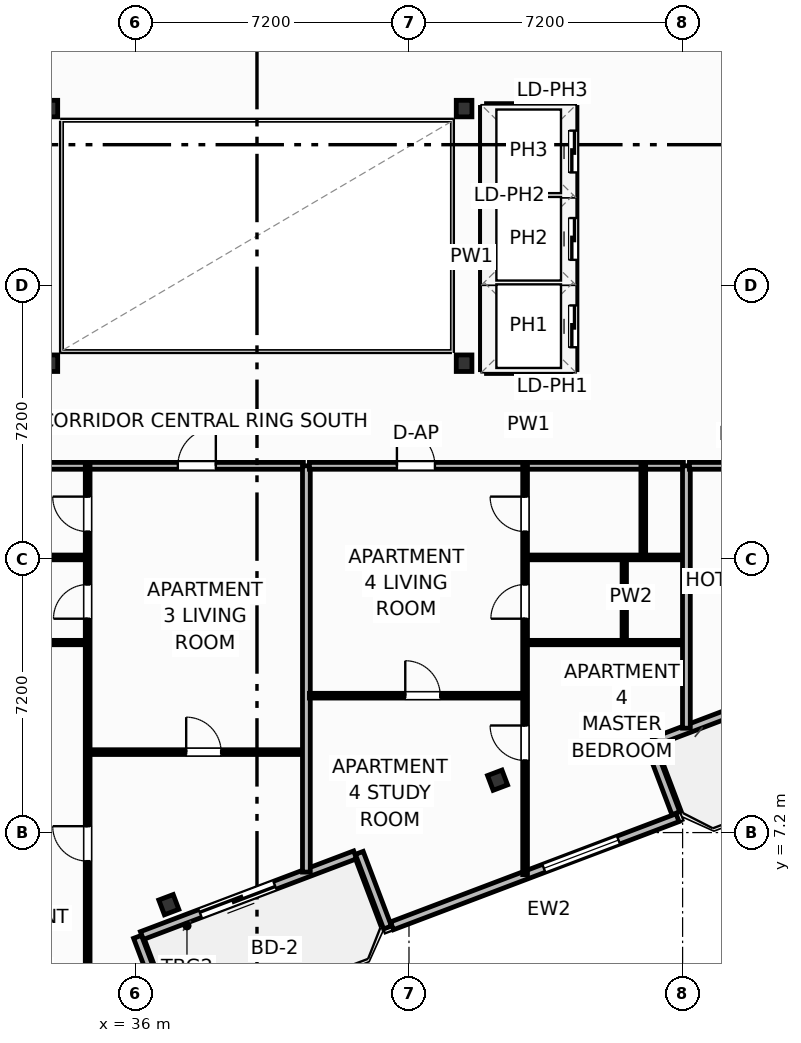
"""IFC4 building model, lengths in metres.
Left out: names, types, materials, properties, quantities, classifications, styles, units other than length and angle.
Written with IfcOpenShell. Run it as: python <this file> out.ifc"""

import sys

from ifc_helpers import new_model, si_unit, direction, frame, frame_2d, origin, origin_2d, place, context, subcontext, project, spatial, rectangle, i_section, extrude, element, fill, save


model = new_model("IFC4")
c1 = context("Model", 3, precision=1e-05, world=origin(), true_north=direction((0.0, 1.0)))
c2 = subcontext(c1, "Body", "Model", "MODEL_VIEW")
j1 = project(units=[si_unit("LENGTHUNIT", "METRE"), si_unit("PLANEANGLEUNIT", "RADIAN")], contexts=[c1])
p1 = place(None, origin())
s1 = spatial("IfcSite", under=j1, at=p1, CompositionType="ELEMENT")
p2 = place(p1, origin())
s2 = spatial("IfcBuilding", under=s1, at=p2, CompositionType="ELEMENT")
p3 = place(p2, frame((0.0, 0.0, 216.4)))
s3 = spatial("IfcBuildingStorey", under=s2, at=p3, CompositionType="ELEMENT", Elevation=216.4)
for number, where, z_axis, x_axis in (
    (1, (33.75, 19.55, 0.0), (0.0, 0.0, 1.0), (1.0, 0.0, 0.0)),
    (2, (44.65, 19.55, 0.0), (0.0, 0.0, 1.0), (1.0, 0.0, 0.0)),
    (3, (33.75, 26.25, 0.0), (0.0, 0.0, 1.0), (1.0, 0.0, 0.0)),
    (4, (44.65, 26.25, 0.0), (0.0, 0.0, 1.0), (1.0, 0.0, 0.0)),
):
    element("IfcColumn", number, at=place(p3, frame(where, z_axis=z_axis, x_axis=x_axis)), inside=s3, PredefinedType="COLUMN", context=c2, shape_type="SweptSolid", body=[
        extrude(i_section(OverallWidth=0.412, OverallDepth=0.435, WebThickness=0.036, FlangeThickness=0.057, FilletRadius=0.025, at=origin_2d()), origin(), (0.0, 0.0, 1.0), 3.7),
    ])
for number, where, z_axis, x_axis in (
    (5, (36.88, 5.303, 0.0), (0.0, 0.0, 1.0), (0.935, 0.354, 0.0)),
    (6, (45.531, 8.578, 0.0), (0.0, 0.0, 1.0), (0.935, 0.354, 0.0)),
):
    element("IfcColumn", number, at=place(p3, frame(where, z_axis=z_axis, x_axis=x_axis)), inside=s3, PredefinedType="COLUMN", context=c2, shape_type="SweptSolid", body=[
        extrude(i_section(OverallWidth=0.406, OverallDepth=0.416, WebThickness=0.03, FlangeThickness=0.048, FilletRadius=0.025, at=origin_2d()), origin(), (0.0, 0.0, 1.0), 3.7),
    ])
p4 = place(p3, frame((41.783, 6.614, 0.0), z_axis=(0.0, 0.0, 1.0), x_axis=(-0.93521416643, -0.354082565101, 0.0)))
e7 = element("IfcWall", 7, at=p4, inside=s3, PredefinedType="SOLIDWALL", context=c2, shape_type="SweptSolid", body=[
    extrude(rectangle(XDim=6.0, YDim=0.22, at=frame_2d((3.0, 0.0))), origin(), (0.0, 0.0, 1.0), 2.73),
])
p5 = place(p4, frame((2.26, 0.0, 0.0)))
e8 = element("IfcOpeningElement", 8, at=p5, cuts=e7, PredefinedType="OPENING", context=c2, shape_type="SweptSolid", body=[
    extrude(rectangle(XDim=2.1, YDim=2.3, at=frame_2d((1.05, 1.15))), frame((0.0, 0.12, 0.0), z_axis=(0.0, -1.0, 0.0), x_axis=(1.0, 0.0, 0.0)), (0.0, 0.0, 1.0), 0.24),
])
p6 = place(p3, frame((55.25, 11.713, 0.0), z_axis=(0.0, 0.0, 1.0), x_axis=(-0.935227640088, -0.354046976001, 0.0)))
e9 = element("IfcWall", 9, at=p6, inside=s3, PredefinedType="SOLIDWALL", context=c2, shape_type="SweptSolid", body=[
    extrude(rectangle(XDim=6.0, YDim=0.22, at=frame_2d((3.0, 0.0))), origin(), (0.0, 0.0, 1.0), 2.73),
])
p7 = place(p6, frame((1.516, 0.0, 0.0)))
e10 = element("IfcOpeningElement", 10, at=p7, cuts=e9, PredefinedType="OPENING", context=c2, shape_type="SweptSolid", body=[
    extrude(rectangle(XDim=2.1, YDim=2.3, at=frame_2d((1.05, 1.15))), frame((0.0, 0.12, 0.0), z_axis=(0.0, -1.0, 0.0), x_axis=(1.0, 0.0, 0.0)), (0.0, 0.0, 1.0), 0.24),
])
p8 = place(p3, frame((36.755, 2.61, 0.0), z_axis=(0.0, 0.0, 1.0), x_axis=(-0.354020680661, 0.935237594232, 0.0)))
e11 = element("IfcWall", 11, at=p8, inside=s3, PredefinedType="SOLIDWALL", context=c2, shape_type="SweptSolid", body=[
    extrude(rectangle(XDim=1.975, YDim=0.22, at=frame_2d((0.988, 0.0))), origin(), (0.0, 0.0, 1.0), 2.73),
])
p9 = place(p3, frame((41.892, 6.666, 0.0), z_axis=(0.0, 0.0, 1.0), x_axis=(0.354128469405, -0.935196785258, 0.0)))
e12 = element("IfcWall", 12, at=p9, inside=s3, PredefinedType="SOLIDWALL", context=c2, shape_type="SweptSolid", body=[
    extrude(rectangle(XDim=2.1, YDim=0.22, at=frame_2d((1.05, 0.0))), origin(), (0.0, 0.0, 1.0), 2.73),
])
p10 = place(p3, frame((42.752, 4.746, 0.0), z_axis=(0.0, 0.0, 1.0), x_axis=(0.935216926991, 0.354075273733, 0.0)))
e13 = element("IfcWall", 13, at=p10, inside=s3, PredefinedType="SOLIDWALL", context=c2, shape_type="SweptSolid", body=[
    extrude(rectangle(XDim=8.035, YDim=0.22, at=frame_2d((4.018, 0.0))), origin(), (0.0, 0.0, 1.0), 2.73),
])
p11 = place(p10, frame((4.273, 0.0, 0.8)))
e14 = element("IfcOpeningElement", 14, at=p11, cuts=e13, PredefinedType="OPENING", context=c2, shape_type="SweptSolid", body=[
    extrude(rectangle(XDim=2.1, YDim=1.75, at=frame_2d((1.05, 0.875))), frame((0.0, 0.12, 0.0), z_axis=(0.0, -1.0, 0.0), x_axis=(1.0, 0.0, 0.0)), (0.0, 0.0, 1.0), 0.24),
])
p12 = place(p3, frame((50.223, 7.708, 0.0), z_axis=(0.0, 0.0, 1.0), x_axis=(-0.354020680661, 0.935237594232, 0.0)))
e15 = element("IfcWall", 15, at=p12, inside=s3, PredefinedType="SOLIDWALL", context=c2, shape_type="SweptSolid", body=[
    extrude(rectangle(XDim=1.975, YDim=0.22, at=frame_2d((0.988, 0.0))), origin(), (0.0, 0.0, 1.0), 2.73),
])
p13 = place(p3, frame((34.815, 9.317, 0.0), z_axis=(0.0, 0.0, 1.0), x_axis=(1.0, 0.0, 0.0)))
e16 = element("IfcWall", 16, at=p13, inside=s3, PredefinedType="PARTITIONING", context=c2, shape_type="SweptSolid", body=[
    extrude(rectangle(XDim=5.605, YDim=0.125, at=frame_2d((2.803, 0.0))), origin(), (0.0, 0.0, 1.0), 3.45),
])
p14 = place(p13, frame((2.522, 0.0, 0.0)))
e17 = element("IfcOpeningElement", 17, at=p14, cuts=e16, PredefinedType="OPENING", context=c2, shape_type="SweptSolid", body=[
    extrude(rectangle(XDim=0.92, YDim=2.05, at=frame_2d((0.46, 1.025))), frame((0.0, 0.073, 0.0), z_axis=(0.0, -1.0, 0.0), x_axis=(1.0, 0.0, 0.0)), (0.0, 0.0, 1.0), 0.145),
])
p15 = place(p3, frame((30.58, 16.85, 0.0), z_axis=(0.0, 0.0, 1.0), x_axis=(1.0, 0.0, 0.0)))
e18 = element("IfcWall", 18, at=p15, inside=s3, PredefinedType="PARTITIONING", context=c2, shape_type="SweptSolid", body=[
    extrude(rectangle(XDim=9.84, YDim=0.18, at=frame_2d((4.92, 0.0))), origin(), (0.0, 0.0, 1.0), 3.45),
])
p16 = place(p15, frame((6.537, 0.0, 0.0)))
e19 = element("IfcOpeningElement", 19, at=p16, cuts=e18, PredefinedType="OPENING", context=c2, shape_type="SweptSolid", body=[
    extrude(rectangle(XDim=1.0, YDim=2.2, at=frame_2d((0.5, 1.1))), frame((0.0, 0.1, 0.0), z_axis=(0.0, -1.0, 0.0), x_axis=(1.0, 0.0, 0.0)), (0.0, 0.0, 1.0), 0.2),
])
p17 = place(p3, frame((34.745, 1.736, 0.0), z_axis=(0.0, 0.0, 1.0), x_axis=(0.0, 1.0, 0.0)))
e20 = element("IfcWall", 20, at=p17, inside=s3, PredefinedType="PARTITIONING", context=c2, shape_type="SweptSolid", body=[
    extrude(rectangle(XDim=15.114, YDim=0.125, at=frame_2d((7.557, 0.0))), origin(), (0.0, 0.0, 1.0), 2.739),
])
p18 = place(p17, frame((4.712, 0.0, 0.0)))
e21 = element("IfcOpeningElement", 21, at=p18, cuts=e20, PredefinedType="OPENING", context=c2, shape_type="SweptSolid", body=[
    extrude(rectangle(XDim=0.92, YDim=2.05, at=frame_2d((0.46, 1.025))), frame((0.0, 0.073, 0.0), z_axis=(0.0, -1.0, 0.0), x_axis=(1.0, 0.0, 0.0)), (0.0, 0.0, 1.0), 0.145),
])
p19 = place(p17, frame((11.091, 0.0, 0.0)))
e22 = element("IfcOpeningElement", 22, at=p19, cuts=e20, PredefinedType="OPENING", context=c2, shape_type="SweptSolid", body=[
    extrude(rectangle(XDim=0.9, YDim=2.05, at=frame_2d((0.45, 1.025))), frame((0.0, 0.073, 0.0), z_axis=(0.0, -1.0, 0.0), x_axis=(1.0, 0.0, 0.0)), (0.0, 0.0, 1.0), 0.145),
])
p20 = place(p17, frame((13.384, 0.0, 0.0)))
e23 = element("IfcOpeningElement", 23, at=p20, cuts=e20, PredefinedType="OPENING", context=c2, shape_type="SweptSolid", body=[
    extrude(rectangle(XDim=0.92, YDim=2.05, at=frame_2d((0.46, 1.025))), frame((0.0, 0.073, 0.0), z_axis=(0.0, -1.0, 0.0), x_axis=(1.0, 0.0, 0.0)), (0.0, 0.0, 1.0), 0.145),
])
p21 = place(p3, frame((30.58, 14.44, 0.0), z_axis=(0.0, 0.0, 1.0), x_axis=(1.0, 0.0, 0.0)))
e24 = element("IfcWall", 24, at=p21, inside=s3, PredefinedType="PARTITIONING", context=c2, shape_type="SweptSolid", body=[
    extrude(rectangle(XDim=4.095, YDim=0.125, at=frame_2d((2.047, 0.0))), origin(), (0.0, 0.0, 1.0), 3.45),
])
p22 = place(p3, frame((30.58, 12.2, 0.0), z_axis=(0.0, 0.0, 1.0), x_axis=(1.0, 0.0, 0.0)))
e25 = element("IfcWall", 25, at=p22, inside=s3, PredefinedType="PARTITIONING", context=c2, shape_type="SweptSolid", body=[
    extrude(rectangle(XDim=4.095, YDim=0.115, at=frame_2d((2.047, 0.0))), origin(), (0.0, 0.0, 1.0), 3.45),
])
p23 = place(p3, frame((40.5, 6.16, 0.0), z_axis=(0.0, 0.0, 1.0), x_axis=(0.0, 1.0, 0.0)))
e26 = element("IfcWall", 26, at=p23, inside=s3, PredefinedType="PARTITIONING", context=c2, shape_type="SweptSolid", body=[
    extrude(rectangle(XDim=10.69, YDim=0.205, at=frame_2d((5.345, 0.0))), origin(), (0.0, 0.0, 1.0), 3.45),
])
p24 = place(p3, frame((40.58, 10.802, 0.0), z_axis=(0.0, 0.0, 1.0), x_axis=(1.0, 0.0, 0.0)))
e27 = element("IfcWall", 27, at=p24, inside=s3, PredefinedType="PARTITIONING", context=c2, shape_type="SweptSolid", body=[
    extrude(rectangle(XDim=5.605, YDim=0.125, at=frame_2d((2.803, 0.0))), origin(), (0.0, 0.0, 1.0), 3.45),
])
p25 = place(p24, frame((2.522, 0.0, 0.0)))
e28 = element("IfcOpeningElement", 28, at=p25, cuts=e27, PredefinedType="OPENING", context=c2, shape_type="SweptSolid", body=[
    extrude(rectangle(XDim=0.92, YDim=2.05, at=frame_2d((0.46, 1.025))), frame((0.0, 0.073, 0.0), z_axis=(0.0, -1.0, 0.0), x_axis=(1.0, 0.0, 0.0)), (0.0, 0.0, 1.0), 0.145),
])
p26 = place(p3, frame((40.58, 16.85, 0.0), z_axis=(0.0, 0.0, 1.0), x_axis=(1.0, 0.0, 0.0)))
e29 = element("IfcWall", 29, at=p26, inside=s3, PredefinedType="PARTITIONING", context=c2, shape_type="SweptSolid", body=[
    extrude(rectangle(XDim=9.84, YDim=0.18, at=frame_2d((4.92, 0.0))), origin(), (0.0, 0.0, 1.0), 3.45),
])
p27 = place(p26, frame((2.302, 0.0, 0.0)))
e30 = element("IfcOpeningElement", 30, at=p27, cuts=e29, PredefinedType="OPENING", context=c2, shape_type="SweptSolid", body=[
    extrude(rectangle(XDim=1.0, YDim=2.2, at=frame_2d((0.5, 1.1))), frame((0.0, 0.1, 0.0), z_axis=(0.0, -1.0, 0.0), x_axis=(1.0, 0.0, 0.0)), (0.0, 0.0, 1.0), 0.2),
])
p28 = place(p3, frame((46.255, 6.094, 0.0), z_axis=(0.0, 0.0, 1.0), x_axis=(0.0, 1.0, 0.0)))
e31 = element("IfcWall", 31, at=p28, inside=s3, PredefinedType="PARTITIONING", context=c2, shape_type="SweptSolid", body=[
    extrude(rectangle(XDim=10.756, YDim=0.125, at=frame_2d((5.378, 0.0))), origin(), (0.0, 0.0, 1.0), 3.45),
])
p29 = place(p28, frame((3.003, 0.0, 0.0)))
e32 = element("IfcOpeningElement", 32, at=p29, cuts=e31, PredefinedType="OPENING", context=c2, shape_type="SweptSolid", body=[
    extrude(rectangle(XDim=0.92, YDim=2.05, at=frame_2d((0.46, 1.025))), frame((0.0, 0.073, 0.0), z_axis=(0.0, -1.0, 0.0), x_axis=(1.0, 0.0, 0.0)), (0.0, 0.0, 1.0), 0.145),
])
p30 = place(p28, frame((6.733, 0.0, 0.0)))
e33 = element("IfcOpeningElement", 33, at=p30, cuts=e31, PredefinedType="OPENING", context=c2, shape_type="SweptSolid", body=[
    extrude(rectangle(XDim=0.9, YDim=2.05, at=frame_2d((0.45, 1.025))), frame((0.0, 0.073, 0.0), z_axis=(0.0, -1.0, 0.0), x_axis=(1.0, 0.0, 0.0)), (0.0, 0.0, 1.0), 0.145),
])
p31 = place(p28, frame((9.026, 0.0, 0.0)))
e34 = element("IfcOpeningElement", 34, at=p31, cuts=e31, PredefinedType="OPENING", context=c2, shape_type="SweptSolid", body=[
    extrude(rectangle(XDim=0.92, YDim=2.05, at=frame_2d((0.46, 1.025))), frame((0.0, 0.073, 0.0), z_axis=(0.0, -1.0, 0.0), x_axis=(1.0, 0.0, 0.0)), (0.0, 0.0, 1.0), 0.145),
])
p32 = place(p3, frame((46.325, 14.44, 0.0), z_axis=(0.0, 0.0, 1.0), x_axis=(1.0, 0.0, 0.0)))
e35 = element("IfcWall", 35, at=p32, inside=s3, PredefinedType="PARTITIONING", context=c2, shape_type="SweptSolid", body=[
    extrude(rectangle(XDim=4.095, YDim=0.125, at=frame_2d((2.047, 0.0))), origin(), (0.0, 0.0, 1.0), 3.45),
])
p33 = place(p3, frame((46.325, 12.2, 0.0), z_axis=(0.0, 0.0, 1.0), x_axis=(1.0, 0.0, 0.0)))
e36 = element("IfcWall", 36, at=p33, inside=s3, PredefinedType="PARTITIONING", context=c2, shape_type="SweptSolid", body=[
    extrude(rectangle(XDim=4.095, YDim=0.115, at=frame_2d((2.047, 0.0))), origin(), (0.0, 0.0, 1.0), 3.45),
])
p34 = place(p3, frame((49.365, 14.44, 0.0), z_axis=(0.0, 0.0, 1.0), x_axis=(0.0, 1.0, 0.0)))
e37 = element("IfcWall", 37, at=p34, inside=s3, PredefinedType="PARTITIONING", context=c2, shape_type="SweptSolid", body=[
    extrude(rectangle(XDim=2.41, YDim=0.125, at=frame_2d((1.205, 0.0))), origin(), (0.0, 0.0, 1.0), 3.45),
])
p35 = place(p3, frame((48.865, 12.2, 0.0), z_axis=(0.0, 0.0, 1.0), x_axis=(0.0, 1.0, 0.0)))
e38 = element("IfcWall", 38, at=p35, inside=s3, PredefinedType="PARTITIONING", context=c2, shape_type="SweptSolid", body=[
    extrude(rectangle(XDim=2.24, YDim=0.115, at=frame_2d((1.12, 0.0))), origin(), (0.0, 0.0, 1.0), 3.45),
])
p36 = place(p3, frame((50.5, 9.946, 0.0), z_axis=(0.0, 0.0, 1.0), x_axis=(0.0, 1.0, 0.0)))
e39 = element("IfcWall", 39, at=p36, inside=s3, PredefinedType="PARTITIONING", context=c2, shape_type="SweptSolid", body=[
    extrude(rectangle(XDim=6.904, YDim=0.205, at=frame_2d((3.452, 0.0))), origin(), (0.0, 0.0, 1.0), 3.45),
])
p37 = place(p3, frame((50.58, 16.85, 0.0), z_axis=(0.0, 0.0, 1.0), x_axis=(1.0, 0.0, 0.0)))
e40 = element("IfcWall", 40, at=p37, inside=s3, PredefinedType="PARTITIONING", context=c2, shape_type="SweptSolid", body=[
    extrude(rectangle(XDim=23.404, YDim=0.18, at=frame_2d((11.702, 0.0))), origin(), (0.0, 0.0, 1.0), 3.45),
])
p38 = place(p37, frame((0.935, 0.0, 0.0)))
e41 = element("IfcOpeningElement", 41, at=p38, cuts=e40, PredefinedType="OPENING", context=c2, shape_type="SweptSolid", body=[
    extrude(rectangle(XDim=0.95, YDim=2.15, at=frame_2d((0.475, 1.075))), frame((0.0, 0.1, 0.0), z_axis=(0.0, -1.0, 0.0), x_axis=(1.0, 0.0, 0.0)), (0.0, 0.0, 1.0), 0.2),
])
for number, where, z_axis, x_axis in (
    (42, (45.24, 21.675, 0.0), (0.0, 0.0, 1.0), (1.0, 0.0, 0.0)),
    (43, (45.24, 23.975, 0.0), (0.0, 0.0, 1.0), (1.0, 0.0, 0.0)),
):
    element("IfcWall", number, at=place(p3, frame(where, z_axis=z_axis, x_axis=x_axis)), inside=s3, PredefinedType="PARTITIONING", context=c2, shape_type="SweptSolid", body=[
        extrude(rectangle(XDim=2.22, YDim=0.2, at=frame_2d((1.11, 0.0))), origin(), (0.0, 0.0, 1.0), 3.45),
    ])
p39 = place(p3, frame((45.24, 19.38, 0.0), z_axis=(0.0, 0.0, 1.0), x_axis=(1.0, 0.0, 0.0)))
e44 = element("IfcWall", 44, at=p39, inside=s3, PredefinedType="PARTITIONING", context=c2, shape_type="SweptSolid", body=[
    extrude(rectangle(XDim=2.22, YDim=0.2, at=frame_2d((1.11, 0.0))), origin(), (0.0, 0.0, 1.0), 2.662),
])
p40 = place(p3, frame((45.24, 26.28, 0.0), z_axis=(0.0, 0.0, 1.0), x_axis=(1.0, 0.0, 0.0)))
e45 = element("IfcWall", 45, at=p40, inside=s3, PredefinedType="PARTITIONING", context=c2, shape_type="SweptSolid", body=[
    extrude(rectangle(XDim=2.22, YDim=0.2, at=frame_2d((1.11, 0.0))), origin(), (0.0, 0.0, 1.0), 3.45),
])
p41 = place(p3, frame((45.18, 19.38, 0.0), z_axis=(0.0, 0.0, 1.0), x_axis=(0.0, 1.0, 0.0)))
e46 = element("IfcWall", 46, at=p41, inside=s3, PredefinedType="PARTITIONING", context=c2, shape_type="SweptSolid", body=[
    extrude(rectangle(XDim=6.9, YDim=0.2, at=frame_2d((3.45, 0.0))), origin(), (0.0, 0.0, 1.0), 3.45),
])
p42 = place(p3, frame((47.52, 19.38, 0.0), z_axis=(0.0, 0.0, 1.0), x_axis=(0.0, 1.0, 0.0)))
e47 = element("IfcWall", 47, at=p42, inside=s3, PredefinedType="PARTITIONING", context=c2, shape_type="SweptSolid", body=[
    extrude(rectangle(XDim=6.9, YDim=0.2, at=frame_2d((3.45, 0.0))), origin(), (0.0, 0.0, 1.0), 3.45),
])
p43 = place(p42, frame((0.59, 0.0, 0.0)))
e48 = element("IfcOpeningElement", 48, at=p43, cuts=e47, PredefinedType="OPENING", context=c2, shape_type="SweptSolid", body=[
    extrude(rectangle(XDim=1.1, YDim=2.15, at=frame_2d((0.55, 1.075))), frame((0.0, 0.11, 0.0), z_axis=(0.0, -1.0, 0.0), x_axis=(1.0, 0.0, 0.0)), (0.0, 0.0, 1.0), 0.22),
])
p44 = place(p42, frame((2.89, 0.0, 0.0)))
e49 = element("IfcOpeningElement", 49, at=p44, cuts=e47, PredefinedType="OPENING", context=c2, shape_type="SweptSolid", body=[
    extrude(rectangle(XDim=1.1, YDim=2.15, at=frame_2d((0.55, 1.075))), frame((0.0, 0.11, 0.0), z_axis=(0.0, -1.0, 0.0), x_axis=(1.0, 0.0, 0.0)), (0.0, 0.0, 1.0), 0.22),
])
p45 = place(p42, frame((5.19, 0.0, 0.0)))
e50 = element("IfcOpeningElement", 50, at=p45, cuts=e47, PredefinedType="OPENING", context=c2, shape_type="SweptSolid", body=[
    extrude(rectangle(XDim=1.1, YDim=2.15, at=frame_2d((0.55, 1.075))), frame((0.0, 0.11, 0.0), z_axis=(0.0, -1.0, 0.0), x_axis=(1.0, 0.0, 0.0)), (0.0, 0.0, 1.0), 0.22),
])
p46 = place(p5, origin())
e51 = element("IfcDoor", 51, at=p46, inside=s3, OperationType="SLIDING_TO_LEFT", PredefinedType="DOOR", context=c2, shape_type="SweptSolid", body=[
    extrude(rectangle(XDim=2.1, YDim=2.3, at=frame_2d((1.05, 1.15))), frame((0.0, 0.025, 0.0), z_axis=(0.0, -1.0, 0.0), x_axis=(1.0, 0.0, 0.0)), (0.0, 0.0, 1.0), 0.05),
])
fill(e8, e51)
p47 = place(p11, origin())
e52 = element("IfcWindow", 52, at=p47, inside=s3, PartitioningType="SINGLE_PANEL", PredefinedType="WINDOW", context=c2, shape_type="SweptSolid", body=[
    extrude(rectangle(XDim=2.1, YDim=1.75, at=frame_2d((1.05, 0.875))), frame((0.0, 0.03, 0.0), z_axis=(0.0, -1.0, 0.0), x_axis=(1.0, 0.0, 0.0)), (0.0, 0.0, 1.0), 0.06),
])
fill(e14, e52)
p48 = place(p14, origin())
e53 = element("IfcDoor", 53, at=p48, inside=s3, OperationType="SINGLE_SWING_LEFT", PredefinedType="DOOR", context=c2, shape_type="SweptSolid", body=[
    extrude(rectangle(XDim=0.92, YDim=2.05, at=frame_2d((0.46, 1.025))), frame((0.0, 0.025, 0.0), z_axis=(0.0, -1.0, 0.0), x_axis=(1.0, 0.0, 0.0)), (0.0, 0.0, 1.0), 0.05),
])
fill(e17, e53)
p49 = place(p16, origin())
e54 = element("IfcDoor", 54, at=p49, inside=s3, OperationType="SINGLE_SWING_RIGHT", PredefinedType="DOOR", context=c2, shape_type="SweptSolid", body=[
    extrude(rectangle(XDim=1.0, YDim=2.2, at=frame_2d((0.5, 1.1))), frame((0.0, 0.025, 0.0), z_axis=(0.0, -1.0, 0.0), x_axis=(1.0, 0.0, 0.0)), (0.0, 0.0, 1.0), 0.05),
])
fill(e19, e54)
p50 = place(p18, origin())
e55 = element("IfcDoor", 55, at=p50, inside=s3, OperationType="SINGLE_SWING_RIGHT", PredefinedType="DOOR", context=c2, shape_type="SweptSolid", body=[
    extrude(rectangle(XDim=0.92, YDim=2.05, at=frame_2d((0.46, 1.025))), frame((0.0, 0.025, 0.0), z_axis=(0.0, -1.0, 0.0), x_axis=(1.0, 0.0, 0.0)), (0.0, 0.0, 1.0), 0.05),
])
fill(e21, e55)
p51 = place(p19, origin())
e56 = element("IfcDoor", 56, at=p51, inside=s3, OperationType="SINGLE_SWING_LEFT", PredefinedType="DOOR", context=c2, shape_type="SweptSolid", body=[
    extrude(rectangle(XDim=0.9, YDim=2.05, at=frame_2d((0.45, 1.025))), frame((0.0, 0.025, 0.0), z_axis=(0.0, -1.0, 0.0), x_axis=(1.0, 0.0, 0.0)), (0.0, 0.0, 1.0), 0.05),
])
fill(e22, e56)
p52 = place(p20, origin())
e57 = element("IfcDoor", 57, at=p52, inside=s3, OperationType="SINGLE_SWING_RIGHT", PredefinedType="DOOR", context=c2, shape_type="SweptSolid", body=[
    extrude(rectangle(XDim=0.92, YDim=2.05, at=frame_2d((0.46, 1.025))), frame((0.0, 0.025, 0.0), z_axis=(0.0, -1.0, 0.0), x_axis=(1.0, 0.0, 0.0)), (0.0, 0.0, 1.0), 0.05),
])
fill(e23, e57)
p53 = place(p25, origin())
e58 = element("IfcDoor", 58, at=p53, inside=s3, OperationType="SINGLE_SWING_LEFT", PredefinedType="DOOR", context=c2, shape_type="SweptSolid", body=[
    extrude(rectangle(XDim=0.92, YDim=2.05, at=frame_2d((0.46, 1.025))), frame((0.0, 0.025, 0.0), z_axis=(0.0, -1.0, 0.0), x_axis=(1.0, 0.0, 0.0)), (0.0, 0.0, 1.0), 0.05),
])
fill(e28, e58)
p54 = place(p27, origin())
e59 = element("IfcDoor", 59, at=p54, inside=s3, OperationType="SINGLE_SWING_LEFT", PredefinedType="DOOR", context=c2, shape_type="SweptSolid", body=[
    extrude(rectangle(XDim=1.0, YDim=2.2, at=frame_2d((0.5, 1.1))), frame((0.0, 0.025, 0.0), z_axis=(0.0, -1.0, 0.0), x_axis=(1.0, 0.0, 0.0)), (0.0, 0.0, 1.0), 0.05),
])
fill(e30, e59)
p55 = place(p29, origin())
e60 = element("IfcDoor", 60, at=p55, inside=s3, OperationType="SINGLE_SWING_RIGHT", PredefinedType="DOOR", context=c2, shape_type="SweptSolid", body=[
    extrude(rectangle(XDim=0.92, YDim=2.05, at=frame_2d((0.46, 1.025))), frame((0.0, 0.025, 0.0), z_axis=(0.0, -1.0, 0.0), x_axis=(1.0, 0.0, 0.0)), (0.0, 0.0, 1.0), 0.05),
])
fill(e32, e60)
p56 = place(p30, origin())
e61 = element("IfcDoor", 61, at=p56, inside=s3, OperationType="SINGLE_SWING_LEFT", PredefinedType="DOOR", context=c2, shape_type="SweptSolid", body=[
    extrude(rectangle(XDim=0.9, YDim=2.05, at=frame_2d((0.45, 1.025))), frame((0.0, 0.025, 0.0), z_axis=(0.0, -1.0, 0.0), x_axis=(1.0, 0.0, 0.0)), (0.0, 0.0, 1.0), 0.05),
])
fill(e33, e61)
p57 = place(p31, origin())
e62 = element("IfcDoor", 62, at=p57, inside=s3, OperationType="SINGLE_SWING_RIGHT", PredefinedType="DOOR", context=c2, shape_type="SweptSolid", body=[
    extrude(rectangle(XDim=0.92, YDim=2.05, at=frame_2d((0.46, 1.025))), frame((0.0, 0.025, 0.0), z_axis=(0.0, -1.0, 0.0), x_axis=(1.0, 0.0, 0.0)), (0.0, 0.0, 1.0), 0.05),
])
fill(e34, e62)
p58 = place(p43, origin())
e63 = element("IfcDoor", 63, at=p58, inside=s3, OperationType="SLIDING_TO_LEFT", PredefinedType="DOOR", context=c2, shape_type="SweptSolid", body=[
    extrude(rectangle(XDim=1.1, YDim=2.15, at=frame_2d((0.55, 1.075))), frame((0.0, 0.025, 0.0), z_axis=(0.0, -1.0, 0.0), x_axis=(1.0, 0.0, 0.0)), (0.0, 0.0, 1.0), 0.05),
])
fill(e48, e63)
p59 = place(p44, origin())
e64 = element("IfcDoor", 64, at=p59, inside=s3, OperationType="SLIDING_TO_LEFT", PredefinedType="DOOR", context=c2, shape_type="SweptSolid", body=[
    extrude(rectangle(XDim=1.1, YDim=2.15, at=frame_2d((0.55, 1.075))), frame((0.0, 0.025, 0.0), z_axis=(0.0, -1.0, 0.0), x_axis=(1.0, 0.0, 0.0)), (0.0, 0.0, 1.0), 0.05),
])
fill(e49, e64)
p60 = place(p45, origin())
e65 = element("IfcDoor", 65, at=p60, inside=s3, OperationType="SLIDING_TO_LEFT", PredefinedType="DOOR", context=c2, shape_type="SweptSolid", body=[
    extrude(rectangle(XDim=1.1, YDim=2.15, at=frame_2d((0.55, 1.075))), frame((0.0, 0.025, 0.0), z_axis=(0.0, -1.0, 0.0), x_axis=(1.0, 0.0, 0.0)), (0.0, 0.0, 1.0), 0.05),
])
fill(e50, e65)
save(model, sys.argv[1])
